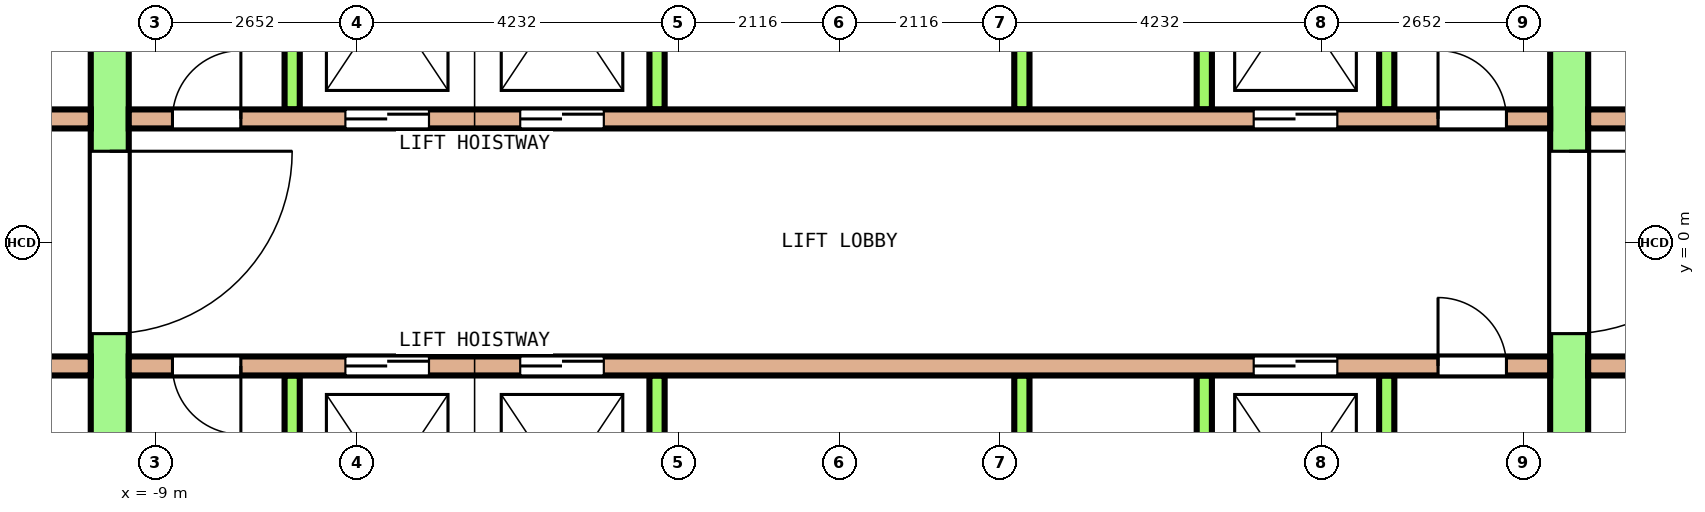
"""IFC4 building model, lengths in metres.
Left out: names, types, materials, properties, quantities, classifications, styles, units other than length and angle.
Written with IfcOpenShell. Run it as: python <this file> out.ifc"""

import sys

from ifc_helpers import new_model, si_unit, direction, frame, frame_2d, origin, place, context, subcontext, project, spatial, rectangle, extrude, element, fill, save


model = new_model("IFC4")
c1 = context("Model", 3, precision=1e-05, world=origin(), true_north=direction((0.0, 1.0)))
c2 = subcontext(c1, "Body", "Model", "MODEL_VIEW")
j1 = project(units=[si_unit("LENGTHUNIT", "METRE"), si_unit("PLANEANGLEUNIT", "RADIAN")], contexts=[c1])
p1 = place(None, origin())
s1 = spatial("IfcSite", under=j1, at=p1, CompositionType="ELEMENT")
p2 = place(p1, origin())
s2 = spatial("IfcBuilding", under=s1, at=p2, CompositionType="ELEMENT")
p3 = place(p2, frame((0.0, 0.0, 130.8)))
s3 = spatial("IfcBuildingStorey", under=s2, at=p3, CompositionType="ELEMENT", Elevation=130.8)
p4 = place(p3, frame((-9.6, -7.7, 0.0), z_axis=(0.0, 0.0, 1.0), x_axis=(0.0, 1.0, 0.0)))
e1 = element("IfcWall", 1, at=p4, inside=s3, PredefinedType="SHEAR", context=c2, shape_type="SweptSolid", body=[
    extrude(rectangle(XDim=15.4, YDim=0.5, at=frame_2d((7.7, 0.0))), origin(), (0.0, 0.0, 1.0), 4.1),
])
p5 = place(p4, frame((6.5, 0.0, 0.0)))
e2 = element("IfcOpeningElement", 2, at=p5, cuts=e1, PredefinedType="OPENING", context=c2, shape_type="SweptSolid", body=[
    extrude(rectangle(XDim=2.4, YDim=2.1, at=frame_2d((1.2, 1.05))), frame((0.0, 0.26, 0.0), z_axis=(0.0, -1.0, 0.0), x_axis=(1.0, 0.0, 0.0)), (0.0, 0.0, 1.0), 0.52),
])
p6 = place(p4, frame((13.4, 0.0, 0.0)))
e3 = element("IfcOpeningElement", 3, at=p6, cuts=e1, PredefinedType="OPENING", context=c2, shape_type="SweptSolid", body=[
    extrude(rectangle(XDim=1.2, YDim=2.1, at=frame_2d((0.6, 1.05))), frame((0.0, 0.26, 0.0), z_axis=(0.0, -1.0, 0.0), x_axis=(1.0, 0.0, 0.0)), (0.0, 0.0, 1.0), 0.52),
])
p7 = place(p4, frame((0.8, 0.0, 0.0)))
e4 = element("IfcOpeningElement", 4, at=p7, cuts=e1, PredefinedType="OPENING", context=c2, shape_type="SweptSolid", body=[
    extrude(rectangle(XDim=1.2, YDim=2.1, at=frame_2d((0.6, 1.05))), frame((0.0, 0.26, 0.0), z_axis=(0.0, -1.0, 0.0), x_axis=(1.0, 0.0, 0.0)), (0.0, 0.0, 1.0), 0.52),
])
p8 = place(p3, frame((9.6, -7.7, 0.0), z_axis=(0.0, 0.0, 1.0), x_axis=(0.0, 1.0, 0.0)))
e5 = element("IfcWall", 5, at=p8, inside=s3, PredefinedType="SHEAR", context=c2, shape_type="SweptSolid", body=[
    extrude(rectangle(XDim=15.4, YDim=0.5, at=frame_2d((7.7, 0.0))), origin(), (0.0, 0.0, 1.0), 4.1),
])
p9 = place(p8, frame((6.5, 0.0, 0.0)))
e6 = element("IfcOpeningElement", 6, at=p9, cuts=e5, PredefinedType="OPENING", context=c2, shape_type="SweptSolid", body=[
    extrude(rectangle(XDim=2.4, YDim=2.1, at=frame_2d((1.2, 1.05))), frame((0.0, 0.26, 0.0), z_axis=(0.0, -1.0, 0.0), x_axis=(1.0, 0.0, 0.0)), (0.0, 0.0, 1.0), 0.52),
])
p10 = place(p8, frame((13.4, 0.0, 0.0)))
e7 = element("IfcOpeningElement", 7, at=p10, cuts=e5, PredefinedType="OPENING", context=c2, shape_type="SweptSolid", body=[
    extrude(rectangle(XDim=1.2, YDim=2.1, at=frame_2d((0.6, 1.05))), frame((0.0, 0.26, 0.0), z_axis=(0.0, -1.0, 0.0), x_axis=(1.0, 0.0, 0.0)), (0.0, 0.0, 1.0), 0.52),
])
p11 = place(p8, frame((0.9, 0.0, 0.0)))
e8 = element("IfcOpeningElement", 8, at=p11, cuts=e5, PredefinedType="OPENING", context=c2, shape_type="SweptSolid", body=[
    extrude(rectangle(XDim=1.0, YDim=2.1, at=frame_2d((0.5, 1.05))), frame((0.0, 0.26, 0.0), z_axis=(0.0, -1.0, 0.0), x_axis=(1.0, 0.0, 0.0)), (0.0, 0.0, 1.0), 0.52),
])
p12 = place(p3, frame((-12.8, 1.625, 0.0), z_axis=(0.0, 0.0, 1.0), x_axis=(1.0, 0.0, 0.0)))
e9 = element("IfcWall", 9, at=p12, inside=s3, PredefinedType="SOLIDWALL", context=c2, shape_type="SweptSolid", body=[
    extrude(rectangle(XDim=2.95, YDim=0.25, at=frame_2d((1.475, 0.0))), origin(), (0.0, 0.0, 1.0), 4.1),
])
p13 = place(p12, frame((1.025, 0.0, 0.0)))
e10 = element("IfcOpeningElement", 10, at=p13, cuts=e9, PredefinedType="OPENING", context=c2, shape_type="SweptSolid", body=[
    extrude(rectangle(XDim=0.9, YDim=2.1, at=frame_2d((0.45, 1.05))), frame((0.0, 0.135, 0.0), z_axis=(0.0, -1.0, 0.0), x_axis=(1.0, 0.0, 0.0)), (0.0, 0.0, 1.0), 0.27),
])
p14 = place(p3, frame((-9.35, 1.625, 0.0), z_axis=(0.0, 0.0, 1.0), x_axis=(1.0, 0.0, 0.0)))
e11 = element("IfcWall", 11, at=p14, inside=s3, PredefinedType="SOLIDWALL", context=c2, shape_type="SweptSolid", body=[
    extrude(rectangle(XDim=18.7, YDim=0.25, at=frame_2d((9.35, 0.0))), origin(), (0.0, 0.0, 1.0), 4.1),
])
p15 = place(p14, frame((2.85, 0.0, 0.0)))
e12 = element("IfcOpeningElement", 12, at=p15, cuts=e11, PredefinedType="OPENING", context=c2, shape_type="SweptSolid", body=[
    extrude(rectangle(XDim=1.1, YDim=2.1, at=frame_2d((0.55, 1.05))), frame((0.0, 0.135, 0.0), z_axis=(0.0, -1.0, 0.0), x_axis=(1.0, 0.0, 0.0)), (0.0, 0.0, 1.0), 0.27),
])
p16 = place(p14, frame((5.15, 0.0, 0.0)))
e13 = element("IfcOpeningElement", 13, at=p16, cuts=e11, PredefinedType="OPENING", context=c2, shape_type="SweptSolid", body=[
    extrude(rectangle(XDim=1.1, YDim=2.1, at=frame_2d((0.55, 1.05))), frame((0.0, 0.135, 0.0), z_axis=(0.0, -1.0, 0.0), x_axis=(1.0, 0.0, 0.0)), (0.0, 0.0, 1.0), 0.27),
])
p17 = place(p14, frame((14.8, 0.0, 0.0)))
e14 = element("IfcOpeningElement", 14, at=p17, cuts=e11, PredefinedType="OPENING", context=c2, shape_type="SweptSolid", body=[
    extrude(rectangle(XDim=1.1, YDim=2.1, at=frame_2d((0.55, 1.05))), frame((0.0, 0.135, 0.0), z_axis=(0.0, -1.0, 0.0), x_axis=(1.0, 0.0, 0.0)), (0.0, 0.0, 1.0), 0.27),
])
p18 = place(p14, frame((0.575, 0.0, 0.0)))
e15 = element("IfcOpeningElement", 15, at=p18, cuts=e11, PredefinedType="OPENING", context=c2, shape_type="SweptSolid", body=[
    extrude(rectangle(XDim=0.9, YDim=2.1, at=frame_2d((0.45, 1.05))), frame((0.0, 0.135, 0.0), z_axis=(0.0, -1.0, 0.0), x_axis=(1.0, 0.0, 0.0)), (0.0, 0.0, 1.0), 0.27),
])
p19 = place(p14, frame((17.225, 0.0, 0.0)))
e16 = element("IfcOpeningElement", 16, at=p19, cuts=e11, PredefinedType="OPENING", context=c2, shape_type="SweptSolid", body=[
    extrude(rectangle(XDim=0.9, YDim=2.1, at=frame_2d((0.45, 1.05))), frame((0.0, 0.135, 0.0), z_axis=(0.0, -1.0, 0.0), x_axis=(1.0, 0.0, 0.0)), (0.0, 0.0, 1.0), 0.27),
])
p20 = place(p3, frame((9.85, 1.625, 0.0), z_axis=(0.0, 0.0, 1.0), x_axis=(1.0, 0.0, 0.0)))
e17 = element("IfcWall", 17, at=p20, inside=s3, PredefinedType="SOLIDWALL", context=c2, shape_type="SweptSolid", body=[
    extrude(rectangle(XDim=2.95, YDim=0.25, at=frame_2d((1.475, 0.0))), origin(), (0.0, 0.0, 1.0), 4.1),
])
p21 = place(p20, frame((1.025, 0.0, 0.0)))
e18 = element("IfcOpeningElement", 18, at=p21, cuts=e17, PredefinedType="OPENING", context=c2, shape_type="SweptSolid", body=[
    extrude(rectangle(XDim=0.9, YDim=2.1, at=frame_2d((0.45, 1.05))), frame((0.0, 0.135, 0.0), z_axis=(0.0, -1.0, 0.0), x_axis=(1.0, 0.0, 0.0)), (0.0, 0.0, 1.0), 0.27),
])
for number, where, z_axis, x_axis in (
    (19, (-7.2, 1.75, 0.0), (0.0, 0.0, 1.0), (0.0, 1.0, 0.0)),
    (20, (-2.4, 1.75, 0.0), (0.0, 0.0, 1.0), (0.0, 1.0, 0.0)),
    (21, (2.4, 1.75, 0.0), (0.0, 0.0, 1.0), (0.0, 1.0, 0.0)),
    (22, (4.8, 1.75, 0.0), (0.0, 0.0, 1.0), (0.0, 1.0, 0.0)),
    (23, (7.2, 1.75, 0.0), (0.0, 0.0, 1.0), (0.0, 1.0, 0.0)),
):
    element("IfcWall", number, at=place(p3, frame(where, z_axis=z_axis, x_axis=x_axis)), inside=s3, PredefinedType="SOLIDWALL", context=c2, shape_type="SweptSolid", body=[
        extrude(rectangle(XDim=2.9, YDim=0.2, at=frame_2d((1.45, 0.0))), origin(), (0.0, 0.0, 1.0), 4.1),
    ])
p22 = place(p3, frame((-12.8, -1.625, 0.0), z_axis=(0.0, 0.0, 1.0), x_axis=(1.0, 0.0, 0.0)))
e24 = element("IfcWall", 24, at=p22, inside=s3, PredefinedType="SOLIDWALL", context=c2, shape_type="SweptSolid", body=[
    extrude(rectangle(XDim=2.95, YDim=0.25, at=frame_2d((1.475, 0.0))), origin(), (0.0, 0.0, 1.0), 4.1),
])
p23 = place(p22, frame((1.025, 0.0, 0.0)))
e25 = element("IfcOpeningElement", 25, at=p23, cuts=e24, PredefinedType="OPENING", context=c2, shape_type="SweptSolid", body=[
    extrude(rectangle(XDim=0.9, YDim=2.1, at=frame_2d((0.45, 1.05))), frame((0.0, 0.135, 0.0), z_axis=(0.0, -1.0, 0.0), x_axis=(1.0, 0.0, 0.0)), (0.0, 0.0, 1.0), 0.27),
])
p24 = place(p3, frame((-9.35, -1.625, 0.0), z_axis=(0.0, 0.0, 1.0), x_axis=(1.0, 0.0, 0.0)))
e26 = element("IfcWall", 26, at=p24, inside=s3, PredefinedType="SOLIDWALL", context=c2, shape_type="SweptSolid", body=[
    extrude(rectangle(XDim=18.7, YDim=0.25, at=frame_2d((9.35, 0.0))), origin(), (0.0, 0.0, 1.0), 4.1),
])
p25 = place(p24, frame((2.85, 0.0, 0.0)))
e27 = element("IfcOpeningElement", 27, at=p25, cuts=e26, PredefinedType="OPENING", context=c2, shape_type="SweptSolid", body=[
    extrude(rectangle(XDim=1.1, YDim=2.1, at=frame_2d((0.55, 1.05))), frame((0.0, 0.135, 0.0), z_axis=(0.0, -1.0, 0.0), x_axis=(1.0, 0.0, 0.0)), (0.0, 0.0, 1.0), 0.27),
])
p26 = place(p24, frame((5.15, 0.0, 0.0)))
e28 = element("IfcOpeningElement", 28, at=p26, cuts=e26, PredefinedType="OPENING", context=c2, shape_type="SweptSolid", body=[
    extrude(rectangle(XDim=1.1, YDim=2.1, at=frame_2d((0.55, 1.05))), frame((0.0, 0.135, 0.0), z_axis=(0.0, -1.0, 0.0), x_axis=(1.0, 0.0, 0.0)), (0.0, 0.0, 1.0), 0.27),
])
p27 = place(p24, frame((14.8, 0.0, 0.0)))
e29 = element("IfcOpeningElement", 29, at=p27, cuts=e26, PredefinedType="OPENING", context=c2, shape_type="SweptSolid", body=[
    extrude(rectangle(XDim=1.1, YDim=2.1, at=frame_2d((0.55, 1.05))), frame((0.0, 0.135, 0.0), z_axis=(0.0, -1.0, 0.0), x_axis=(1.0, 0.0, 0.0)), (0.0, 0.0, 1.0), 0.27),
])
p28 = place(p24, frame((0.575, 0.0, 0.0)))
e30 = element("IfcOpeningElement", 30, at=p28, cuts=e26, PredefinedType="OPENING", context=c2, shape_type="SweptSolid", body=[
    extrude(rectangle(XDim=0.9, YDim=2.1, at=frame_2d((0.45, 1.05))), frame((0.0, 0.135, 0.0), z_axis=(0.0, -1.0, 0.0), x_axis=(1.0, 0.0, 0.0)), (0.0, 0.0, 1.0), 0.27),
])
p29 = place(p24, frame((17.225, 0.0, 0.0)))
e31 = element("IfcOpeningElement", 31, at=p29, cuts=e26, PredefinedType="OPENING", context=c2, shape_type="SweptSolid", body=[
    extrude(rectangle(XDim=0.9, YDim=2.1, at=frame_2d((0.45, 1.05))), frame((0.0, 0.135, 0.0), z_axis=(0.0, -1.0, 0.0), x_axis=(1.0, 0.0, 0.0)), (0.0, 0.0, 1.0), 0.27),
])
p30 = place(p3, frame((9.85, -1.625, 0.0), z_axis=(0.0, 0.0, 1.0), x_axis=(1.0, 0.0, 0.0)))
e32 = element("IfcWall", 32, at=p30, inside=s3, PredefinedType="SOLIDWALL", context=c2, shape_type="SweptSolid", body=[
    extrude(rectangle(XDim=2.95, YDim=0.25, at=frame_2d((1.475, 0.0))), origin(), (0.0, 0.0, 1.0), 4.1),
])
p31 = place(p30, frame((1.025, 0.0, 0.0)))
e33 = element("IfcOpeningElement", 33, at=p31, cuts=e32, PredefinedType="OPENING", context=c2, shape_type="SweptSolid", body=[
    extrude(rectangle(XDim=0.9, YDim=2.1, at=frame_2d((0.45, 1.05))), frame((0.0, 0.135, 0.0), z_axis=(0.0, -1.0, 0.0), x_axis=(1.0, 0.0, 0.0)), (0.0, 0.0, 1.0), 0.27),
])
for number, where, z_axis, x_axis in (
    (34, (-7.2, -4.65, 0.0), (0.0, 0.0, 1.0), (0.0, 1.0, 0.0)),
    (35, (-2.4, -4.65, 0.0), (0.0, 0.0, 1.0), (0.0, 1.0, 0.0)),
    (36, (2.4, -4.65, 0.0), (0.0, 0.0, 1.0), (0.0, 1.0, 0.0)),
    (37, (4.8, -4.65, 0.0), (0.0, 0.0, 1.0), (0.0, 1.0, 0.0)),
    (38, (7.2, -4.65, 0.0), (0.0, 0.0, 1.0), (0.0, 1.0, 0.0)),
):
    element("IfcWall", number, at=place(p3, frame(where, z_axis=z_axis, x_axis=x_axis)), inside=s3, PredefinedType="SOLIDWALL", context=c2, shape_type="SweptSolid", body=[
        extrude(rectangle(XDim=2.9, YDim=0.2, at=frame_2d((1.45, 0.0))), origin(), (0.0, 0.0, 1.0), 4.1),
    ])
p32 = place(p15, origin())
e39 = element("IfcDoor", 39, at=p32, inside=s3, OperationType="DOUBLE_DOOR_SLIDING", PredefinedType="DOOR", context=c2, shape_type="SweptSolid", body=[
    extrude(rectangle(XDim=1.1, YDim=2.1, at=frame_2d((0.55, 1.05))), frame((0.0, 0.075, 0.0), z_axis=(0.0, -1.0, 0.0), x_axis=(1.0, 0.0, 0.0)), (0.0, 0.0, 1.0), 0.15),
])
fill(e12, e39)
p33 = place(p16, origin())
e40 = element("IfcDoor", 40, at=p33, inside=s3, OperationType="DOUBLE_DOOR_SLIDING", PredefinedType="DOOR", context=c2, shape_type="SweptSolid", body=[
    extrude(rectangle(XDim=1.1, YDim=2.1, at=frame_2d((0.55, 1.05))), frame((0.0, 0.075, 0.0), z_axis=(0.0, -1.0, 0.0), x_axis=(1.0, 0.0, 0.0)), (0.0, 0.0, 1.0), 0.15),
])
fill(e13, e40)
p34 = place(p17, origin())
e41 = element("IfcDoor", 41, at=p34, inside=s3, OperationType="DOUBLE_DOOR_SLIDING", PredefinedType="DOOR", context=c2, shape_type="SweptSolid", body=[
    extrude(rectangle(XDim=1.1, YDim=2.1, at=frame_2d((0.55, 1.05))), frame((0.0, 0.075, 0.0), z_axis=(0.0, -1.0, 0.0), x_axis=(1.0, 0.0, 0.0)), (0.0, 0.0, 1.0), 0.15),
])
fill(e14, e41)
p35 = place(p25, origin())
e42 = element("IfcDoor", 42, at=p35, inside=s3, OperationType="DOUBLE_DOOR_SLIDING", PredefinedType="DOOR", context=c2, shape_type="SweptSolid", body=[
    extrude(rectangle(XDim=1.1, YDim=2.1, at=frame_2d((0.55, 1.05))), frame((0.0, 0.075, 0.0), z_axis=(0.0, -1.0, 0.0), x_axis=(1.0, 0.0, 0.0)), (0.0, 0.0, 1.0), 0.15),
])
fill(e27, e42)
p36 = place(p26, origin())
e43 = element("IfcDoor", 43, at=p36, inside=s3, OperationType="DOUBLE_DOOR_SLIDING", PredefinedType="DOOR", context=c2, shape_type="SweptSolid", body=[
    extrude(rectangle(XDim=1.1, YDim=2.1, at=frame_2d((0.55, 1.05))), frame((0.0, 0.075, 0.0), z_axis=(0.0, -1.0, 0.0), x_axis=(1.0, 0.0, 0.0)), (0.0, 0.0, 1.0), 0.15),
])
fill(e28, e43)
p37 = place(p27, origin())
e44 = element("IfcDoor", 44, at=p37, inside=s3, OperationType="DOUBLE_DOOR_SLIDING", PredefinedType="DOOR", context=c2, shape_type="SweptSolid", body=[
    extrude(rectangle(XDim=1.1, YDim=2.1, at=frame_2d((0.55, 1.05))), frame((0.0, 0.075, 0.0), z_axis=(0.0, -1.0, 0.0), x_axis=(1.0, 0.0, 0.0)), (0.0, 0.0, 1.0), 0.15),
])
fill(e29, e44)
p38 = place(p5, origin())
e45 = element("IfcDoor", 45, at=p38, inside=s3, OperationType="DOUBLE_DOOR_SINGLE_SWING", PredefinedType="DOOR", context=c2, shape_type="SweptSolid", body=[
    extrude(rectangle(XDim=2.4, YDim=2.1, at=frame_2d((1.2, 1.05))), frame((0.0, 0.2, 0.0), z_axis=(0.0, -1.0, 0.0), x_axis=(1.0, 0.0, 0.0)), (0.0, 0.0, 1.0), 0.4),
])
fill(e2, e45)
p39 = place(p9, origin())
e46 = element("IfcDoor", 46, at=p39, inside=s3, OperationType="DOUBLE_DOOR_SINGLE_SWING", PredefinedType="DOOR", context=c2, shape_type="SweptSolid", body=[
    extrude(rectangle(XDim=2.4, YDim=2.1, at=frame_2d((1.2, 1.05))), frame((0.0, 0.2, 0.0), z_axis=(0.0, -1.0, 0.0), x_axis=(1.0, 0.0, 0.0)), (0.0, 0.0, 1.0), 0.4),
])
fill(e6, e46)
p40 = place(p18, origin())
e47 = element("IfcDoor", 47, at=p40, inside=s3, OperationType="SINGLE_SWING_LEFT", PredefinedType="DOOR", context=c2, shape_type="SweptSolid", body=[
    extrude(rectangle(XDim=0.9, YDim=2.1, at=frame_2d((0.45, 1.05))), frame((0.0, 0.075, 0.0), z_axis=(0.0, -1.0, 0.0), x_axis=(1.0, 0.0, 0.0)), (0.0, 0.0, 1.0), 0.15),
])
fill(e15, e47)
p41 = place(p19, origin())
e48 = element("IfcDoor", 48, at=p41, inside=s3, OperationType="SINGLE_SWING_RIGHT", PredefinedType="DOOR", context=c2, shape_type="SweptSolid", body=[
    extrude(rectangle(XDim=0.9, YDim=2.1, at=frame_2d((0.45, 1.05))), frame((0.0, 0.075, 0.0), z_axis=(0.0, -1.0, 0.0), x_axis=(1.0, 0.0, 0.0)), (0.0, 0.0, 1.0), 0.15),
])
fill(e16, e48)
p42 = place(p28, origin())
e49 = element("IfcDoor", 49, at=p42, inside=s3, OperationType="SINGLE_SWING_LEFT", PredefinedType="DOOR", context=c2, shape_type="SweptSolid", body=[
    extrude(rectangle(XDim=0.9, YDim=2.1, at=frame_2d((0.45, 1.05))), frame((0.0, 0.075, 0.0), z_axis=(0.0, -1.0, 0.0), x_axis=(1.0, 0.0, 0.0)), (0.0, 0.0, 1.0), 0.15),
])
fill(e30, e49)
p43 = place(p29, origin())
e50 = element("IfcDoor", 50, at=p43, inside=s3, OperationType="SINGLE_SWING_RIGHT", PredefinedType="DOOR", context=c2, shape_type="SweptSolid", body=[
    extrude(rectangle(XDim=0.9, YDim=2.1, at=frame_2d((0.45, 1.05))), frame((0.0, 0.075, 0.0), z_axis=(0.0, -1.0, 0.0), x_axis=(1.0, 0.0, 0.0)), (0.0, 0.0, 1.0), 0.15),
])
fill(e31, e50)
save(model, sys.argv[1])
